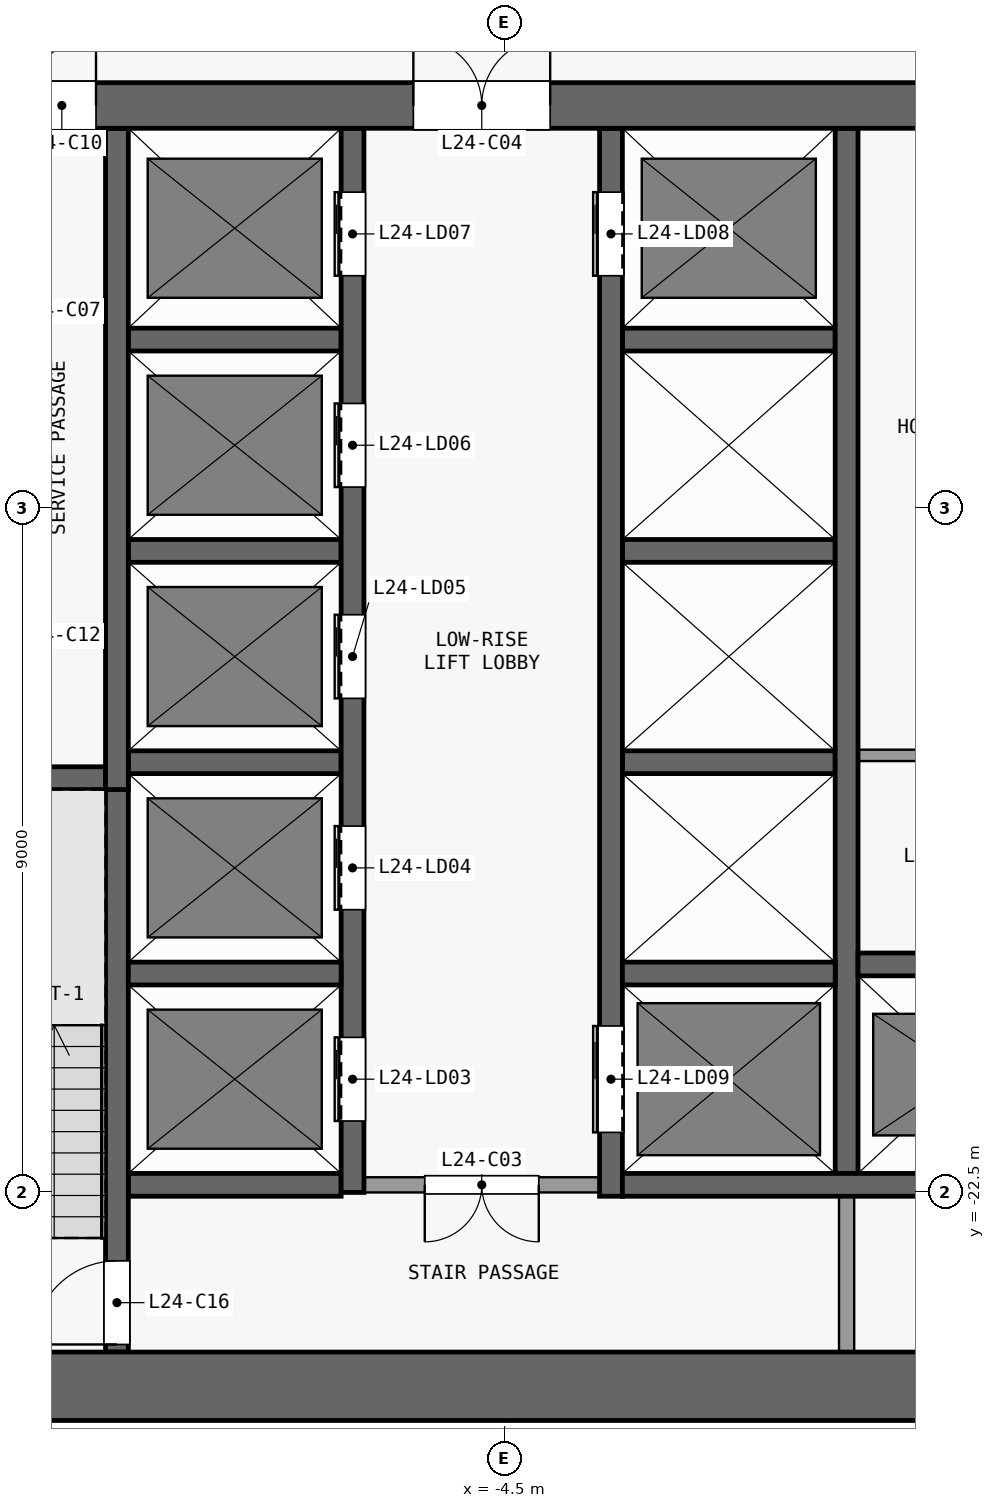
"""IFC4 building model, lengths in metres.
Left out: names, types, materials, properties, quantities, classifications, styles, units other than length and angle.
Written with IfcOpenShell. Run it as: python <this file> out.ifc"""

import sys

from ifc_helpers import new_model, si_unit, direction, frame, frame_2d, origin, place, context, subcontext, project, spatial, rectangle, extrude, element, fill, save


model = new_model("IFC4")
c1 = context("Model", 3, precision=1e-05, world=origin(), true_north=direction((0.0, 1.0)))
c2 = subcontext(c1, "Body", "Model", "MODEL_VIEW")
j1 = project(units=[si_unit("LENGTHUNIT", "METRE"), si_unit("PLANEANGLEUNIT", "RADIAN")], contexts=[c1])
p1 = place(None, origin())
s1 = spatial("IfcSite", under=j1, at=p1, CompositionType="ELEMENT")
p2 = place(p1, origin())
s2 = spatial("IfcBuilding", under=s1, at=p2, CompositionType="ELEMENT")
p3 = place(p2, frame((0.0, 0.0, 99.1)))
s3 = spatial("IfcBuildingStorey", under=s2, at=p3, CompositionType="ELEMENT", Elevation=99.1)
p4 = place(p3, frame((-13.4, -25.05, 0.0), z_axis=(0.0, 0.0, 1.0), x_axis=(1.0, 0.0, 0.0)))
e1 = element("IfcWall", 1, at=p4, inside=s3, PredefinedType="SHEAR", context=c2, shape_type="SweptSolid", body=[
    extrude(rectangle(XDim=26.8, YDim=0.9, at=frame_2d((13.4, 0.0))), origin(), (0.0, 0.0, 1.0), 3.3),
])
p5 = place(p3, frame((-13.4, -8.2, 0.0), z_axis=(0.0, 0.0, 1.0), x_axis=(1.0, 0.0, 0.0)))
e2 = element("IfcWall", 2, at=p5, inside=s3, PredefinedType="SHEAR", context=c2, shape_type="SweptSolid", body=[
    extrude(rectangle(XDim=26.8, YDim=0.6, at=frame_2d((13.4, 0.0))), origin(), (0.0, 0.0, 1.0), 3.3),
])
p6 = place(p5, frame((7.7, 0.0, 0.0)))
e3 = element("IfcOpeningElement", 3, at=p6, cuts=e2, PredefinedType="OPENING", context=c2, shape_type="SweptSolid", body=[
    extrude(rectangle(XDim=1.8, YDim=2.1, at=frame_2d((0.9, 1.05))), frame((0.0, 0.31, 0.0), z_axis=(0.0, -1.0, 0.0), x_axis=(1.0, 0.0, 0.0)), (0.0, 0.0, 1.0), 0.62),
])
p7 = place(p5, frame((17.3, 0.0, 0.0)))
e4 = element("IfcOpeningElement", 4, at=p7, cuts=e2, PredefinedType="OPENING", context=c2, shape_type="SweptSolid", body=[
    extrude(rectangle(XDim=1.8, YDim=2.1, at=frame_2d((0.9, 1.05))), frame((0.0, 0.31, 0.0), z_axis=(0.0, -1.0, 0.0), x_axis=(1.0, 0.0, 0.0)), (0.0, 0.0, 1.0), 0.62),
])
p8 = place(p5, frame((2.625, 0.0, 0.0)))
e5 = element("IfcOpeningElement", 5, at=p8, cuts=e2, PredefinedType="OPENING", context=c2, shape_type="SweptSolid", body=[
    extrude(rectangle(XDim=0.9, YDim=2.1, at=frame_2d((0.45, 1.05))), frame((0.0, 0.31, 0.0), z_axis=(0.0, -1.0, 0.0), x_axis=(1.0, 0.0, 0.0)), (0.0, 0.0, 1.0), 0.62),
])
p9 = place(p5, frame((23.275, 0.0, 0.0)))
e6 = element("IfcOpeningElement", 6, at=p9, cuts=e2, PredefinedType="OPENING", context=c2, shape_type="SweptSolid", body=[
    extrude(rectangle(XDim=0.9, YDim=2.1, at=frame_2d((0.45, 1.05))), frame((0.0, 0.31, 0.0), z_axis=(0.0, -1.0, 0.0), x_axis=(1.0, 0.0, 0.0)), (0.0, 0.0, 1.0), 0.62),
])
p10 = place(p3, frame((-9.45, -22.4, 0.0), z_axis=(0.0, 0.0, 1.0), x_axis=(1.0, 0.0, 0.0)))
e7 = element("IfcWall", 7, at=p10, inside=s3, PredefinedType="SHEAR", context=c2, shape_type="SweptSolid", body=[
    extrude(rectangle(XDim=2.8, YDim=0.3, at=frame_2d((1.4, 0.0))), origin(), (0.0, 0.0, 1.0), 3.3),
])
p11 = place(p3, frame((-3.25, -22.4, 0.0), z_axis=(0.0, 0.0, 1.0), x_axis=(-1.0, 0.0, 0.0)))
e8 = element("IfcWall", 8, at=p11, inside=s3, PredefinedType="PARTITIONING", context=c2, shape_type="SweptSolid", body=[
    extrude(rectangle(XDim=3.1, YDim=0.2, at=frame_2d((1.55, 0.0))), origin(), (0.0, 0.0, 1.0), 3.3),
])
p12 = place(p11, frame((0.8, 0.0, 0.0)))
e9 = element("IfcOpeningElement", 9, at=p12, cuts=e8, PredefinedType="OPENING", context=c2, shape_type="SweptSolid", body=[
    extrude(rectangle(XDim=1.5, YDim=2.1, at=frame_2d((0.75, 1.05))), frame((0.0, 0.11, 0.0), z_axis=(0.0, -1.0, 0.0), x_axis=(1.0, 0.0, 0.0)), (0.0, 0.0, 1.0), 0.22),
])
p13 = place(p3, frame((-2.95, -22.4, 0.0), z_axis=(0.0, 0.0, 1.0), x_axis=(1.0, 0.0, 0.0)))
e10 = element("IfcWall", 10, at=p13, inside=s3, PredefinedType="SHEAR", context=c2, shape_type="SweptSolid", body=[
    extrude(rectangle(XDim=6.2, YDim=0.3, at=frame_2d((3.1, 0.0))), origin(), (0.0, 0.0, 1.0), 3.3),
])
for number, where, z_axis, x_axis in (
    (11, (-9.45, -19.62, 0.0), (0.0, 0.0, 1.0), (1.0, 0.0, 0.0)),
    (12, (-2.95, -19.62, 0.0), (0.0, 0.0, 1.0), (1.0, 0.0, 0.0)),
):
    element("IfcWall", number, at=place(p3, frame(where, z_axis=z_axis, x_axis=x_axis)), inside=s3, PredefinedType="SHEAR", context=c2, shape_type="SweptSolid", body=[
        extrude(rectangle(XDim=2.8, YDim=0.3, at=frame_2d((1.4, 0.0))), origin(), (0.0, 0.0, 1.0), 3.3),
    ])
p14 = place(p3, frame((0.15, -19.5, 0.0), z_axis=(0.0, 0.0, 1.0), x_axis=(1.0, 0.0, 0.0)))
e13 = element("IfcWall", 13, at=p14, inside=s3, PredefinedType="SHEAR", context=c2, shape_type="SweptSolid", body=[
    extrude(rectangle(XDim=3.025, YDim=0.3, at=frame_2d((1.513, 0.0))), origin(), (0.0, 0.0, 1.0), 3.3),
])
p15 = place(p3, frame((-12.6, -17.05, 0.0), z_axis=(0.0, 0.0, 1.0), x_axis=(1.0, 0.0, 0.0)))
e14 = element("IfcWall", 14, at=p15, inside=s3, PredefinedType="SHEAR", context=c2, shape_type="SweptSolid", body=[
    extrude(rectangle(XDim=2.85, YDim=0.3, at=frame_2d((1.425, 0.0))), origin(), (0.0, 0.0, 1.0), 3.3),
])
for number, where, z_axis, x_axis in (
    (15, (-9.45, -16.84, 0.0), (0.0, 0.0, 1.0), (1.0, 0.0, 0.0)),
    (16, (-2.95, -16.84, 0.0), (0.0, 0.0, 1.0), (1.0, 0.0, 0.0)),
):
    element("IfcWall", number, at=place(p3, frame(where, z_axis=z_axis, x_axis=x_axis)), inside=s3, PredefinedType="SHEAR", context=c2, shape_type="SweptSolid", body=[
        extrude(rectangle(XDim=2.8, YDim=0.3, at=frame_2d((1.4, 0.0))), origin(), (0.0, 0.0, 1.0), 3.3),
    ])
p16 = place(p3, frame((0.15, -16.75, 0.0), z_axis=(0.0, 0.0, 1.0), x_axis=(1.0, 0.0, 0.0)))
e17 = element("IfcWall", 17, at=p16, inside=s3, PredefinedType="PARTITIONING", context=c2, shape_type="SweptSolid", body=[
    extrude(rectangle(XDim=2.875, YDim=0.15, at=frame_2d((1.438, 0.0))), origin(), (0.0, 0.0, 1.0), 3.3),
])
for number, where, z_axis, x_axis in (
    (18, (-9.45, -14.06, 0.0), (0.0, 0.0, 1.0), (1.0, 0.0, 0.0)),
    (19, (-2.95, -14.06, 0.0), (0.0, 0.0, 1.0), (1.0, 0.0, 0.0)),
    (20, (-9.45, -11.28, 0.0), (0.0, 0.0, 1.0), (1.0, 0.0, 0.0)),
    (21, (-2.95, -11.28, 0.0), (0.0, 0.0, 1.0), (1.0, 0.0, 0.0)),
):
    element("IfcWall", number, at=place(p3, frame(where, z_axis=z_axis, x_axis=x_axis)), inside=s3, PredefinedType="SHEAR", context=c2, shape_type="SweptSolid", body=[
        extrude(rectangle(XDim=2.8, YDim=0.3, at=frame_2d((1.4, 0.0))), origin(), (0.0, 0.0, 1.0), 3.3),
    ])
p17 = place(p3, frame((-9.6, -24.6, 0.0), z_axis=(0.0, 0.0, 1.0), x_axis=(0.0, 1.0, 0.0)))
e22 = element("IfcWall", 22, at=p17, inside=s3, PredefinedType="SHEAR", context=c2, shape_type="SweptSolid", body=[
    extrude(rectangle(XDim=7.7, YDim=0.3, at=frame_2d((3.85, 0.0))), origin(), (0.0, 0.0, 1.0), 3.3),
])
p18 = place(p17, frame((0.1, 0.0, 0.0)))
e23 = element("IfcOpeningElement", 23, at=p18, cuts=e22, PredefinedType="OPENING", context=c2, shape_type="SweptSolid", body=[
    extrude(rectangle(XDim=1.1, YDim=2.1, at=frame_2d((0.55, 1.05))), frame((0.0, 0.16, 0.0), z_axis=(0.0, -1.0, 0.0), x_axis=(1.0, 0.0, 0.0)), (0.0, 0.0, 1.0), 0.32),
])
p19 = place(p3, frame((-9.6, -17.2, 0.0), z_axis=(0.0, 0.0, 1.0), x_axis=(0.0, 1.0, 0.0)))
e24 = element("IfcWall", 24, at=p19, inside=s3, PredefinedType="SHEAR", context=c2, shape_type="SweptSolid", body=[
    extrude(rectangle(XDim=8.7, YDim=0.3, at=frame_2d((4.35, 0.0))), origin(), (0.0, 0.0, 1.0), 3.3),
])
p20 = place(p3, frame((-6.5, -22.5, 0.0), z_axis=(0.0, 0.0, 1.0), x_axis=(0.0, 1.0, 0.0)))
e25 = element("IfcWall", 25, at=p20, inside=s3, PredefinedType="SHEAR", context=c2, shape_type="SweptSolid", body=[
    extrude(rectangle(XDim=14.0, YDim=0.3, at=frame_2d((7.0, 0.0))), origin(), (0.0, 0.0, 1.0), 3.3),
])
p21 = place(p20, frame((0.94, 0.0, 0.0)))
e26 = element("IfcOpeningElement", 26, at=p21, cuts=e25, PredefinedType="OPENING", context=c2, shape_type="SweptSolid", body=[
    extrude(rectangle(XDim=1.1, YDim=2.1, at=frame_2d((0.55, 1.05))), frame((0.0, 0.16, 0.0), z_axis=(0.0, -1.0, 0.0), x_axis=(1.0, 0.0, 0.0)), (0.0, 0.0, 1.0), 0.32),
])
p22 = place(p20, frame((3.72, 0.0, 0.0)))
e27 = element("IfcOpeningElement", 27, at=p22, cuts=e25, PredefinedType="OPENING", context=c2, shape_type="SweptSolid", body=[
    extrude(rectangle(XDim=1.1, YDim=2.1, at=frame_2d((0.55, 1.05))), frame((0.0, 0.16, 0.0), z_axis=(0.0, -1.0, 0.0), x_axis=(1.0, 0.0, 0.0)), (0.0, 0.0, 1.0), 0.32),
])
p23 = place(p20, frame((6.5, 0.0, 0.0)))
e28 = element("IfcOpeningElement", 28, at=p23, cuts=e25, PredefinedType="OPENING", context=c2, shape_type="SweptSolid", body=[
    extrude(rectangle(XDim=1.1, YDim=2.1, at=frame_2d((0.55, 1.05))), frame((0.0, 0.16, 0.0), z_axis=(0.0, -1.0, 0.0), x_axis=(1.0, 0.0, 0.0)), (0.0, 0.0, 1.0), 0.32),
])
p24 = place(p20, frame((9.28, 0.0, 0.0)))
e29 = element("IfcOpeningElement", 29, at=p24, cuts=e25, PredefinedType="OPENING", context=c2, shape_type="SweptSolid", body=[
    extrude(rectangle(XDim=1.1, YDim=2.1, at=frame_2d((0.55, 1.05))), frame((0.0, 0.16, 0.0), z_axis=(0.0, -1.0, 0.0), x_axis=(1.0, 0.0, 0.0)), (0.0, 0.0, 1.0), 0.32),
])
p25 = place(p20, frame((12.06, 0.0, 0.0)))
e30 = element("IfcOpeningElement", 30, at=p25, cuts=e25, PredefinedType="OPENING", context=c2, shape_type="SweptSolid", body=[
    extrude(rectangle(XDim=1.1, YDim=2.1, at=frame_2d((0.55, 1.05))), frame((0.0, 0.16, 0.0), z_axis=(0.0, -1.0, 0.0), x_axis=(1.0, 0.0, 0.0)), (0.0, 0.0, 1.0), 0.32),
])
p26 = place(p3, frame((-3.1, -22.55, 0.0), z_axis=(0.0, 0.0, 1.0), x_axis=(0.0, 1.0, 0.0)))
e31 = element("IfcWall", 31, at=p26, inside=s3, PredefinedType="SHEAR", context=c2, shape_type="SweptSolid", body=[
    extrude(rectangle(XDim=14.05, YDim=0.3, at=frame_2d((7.025, 0.0))), origin(), (0.0, 0.0, 1.0), 3.3),
])
p27 = place(p26, frame((12.11, 0.0, 0.0)))
e32 = element("IfcOpeningElement", 32, at=p27, cuts=e31, PredefinedType="OPENING", context=c2, shape_type="SweptSolid", body=[
    extrude(rectangle(XDim=1.1, YDim=2.1, at=frame_2d((0.55, 1.05))), frame((0.0, 0.16, 0.0), z_axis=(0.0, -1.0, 0.0), x_axis=(1.0, 0.0, 0.0)), (0.0, 0.0, 1.0), 0.32),
])
p28 = place(p26, frame((0.84, 0.0, 0.0)))
e33 = element("IfcOpeningElement", 33, at=p28, cuts=e31, PredefinedType="OPENING", context=c2, shape_type="SweptSolid", body=[
    extrude(rectangle(XDim=1.4, YDim=2.1, at=frame_2d((0.7, 1.05))), frame((0.0, 0.16, 0.0), z_axis=(0.0, -1.0, 0.0), x_axis=(1.0, 0.0, 0.0)), (0.0, 0.0, 1.0), 0.32),
])
p29 = place(p3, frame((0.0, -24.6, 0.0), z_axis=(0.0, 0.0, 1.0), x_axis=(0.0, 1.0, 0.0)))
e34 = element("IfcWall", 34, at=p29, inside=s3, PredefinedType="PARTITIONING", context=c2, shape_type="SweptSolid", body=[
    extrude(rectangle(XDim=2.05, YDim=0.2, at=frame_2d((1.025, 0.0))), origin(), (0.0, 0.0, 1.0), 3.3),
])
p30 = place(p3, frame((0.0, -22.25, 0.0), z_axis=(0.0, 0.0, 1.0), x_axis=(0.0, 1.0, 0.0)))
e35 = element("IfcWall", 35, at=p30, inside=s3, PredefinedType="SHEAR", context=c2, shape_type="SweptSolid", body=[
    extrude(rectangle(XDim=13.75, YDim=0.3, at=frame_2d((6.875, 0.0))), origin(), (0.0, 0.0, 1.0), 3.3),
])
p31 = place(p21, origin())
e36 = element("IfcDoor", 36, at=p31, inside=s3, OperationType="DOUBLE_DOOR_SLIDING", PredefinedType="DOOR", context=c2, shape_type="SweptSolid", body=[
    extrude(rectangle(XDim=1.1, YDim=2.1, at=frame_2d((0.55, 1.05))), frame((0.0, 0.025, 0.0), z_axis=(0.0, -1.0, 0.0), x_axis=(1.0, 0.0, 0.0)), (0.0, 0.0, 1.0), 0.05),
])
fill(e26, e36)
p32 = place(p22, origin())
e37 = element("IfcDoor", 37, at=p32, inside=s3, OperationType="DOUBLE_DOOR_SLIDING", PredefinedType="DOOR", context=c2, shape_type="SweptSolid", body=[
    extrude(rectangle(XDim=1.1, YDim=2.1, at=frame_2d((0.55, 1.05))), frame((0.0, 0.025, 0.0), z_axis=(0.0, -1.0, 0.0), x_axis=(1.0, 0.0, 0.0)), (0.0, 0.0, 1.0), 0.05),
])
fill(e27, e37)
p33 = place(p23, origin())
e38 = element("IfcDoor", 38, at=p33, inside=s3, OperationType="DOUBLE_DOOR_SLIDING", PredefinedType="DOOR", context=c2, shape_type="SweptSolid", body=[
    extrude(rectangle(XDim=1.1, YDim=2.1, at=frame_2d((0.55, 1.05))), frame((0.0, 0.025, 0.0), z_axis=(0.0, -1.0, 0.0), x_axis=(1.0, 0.0, 0.0)), (0.0, 0.0, 1.0), 0.05),
])
fill(e28, e38)
p34 = place(p24, origin())
e39 = element("IfcDoor", 39, at=p34, inside=s3, OperationType="DOUBLE_DOOR_SLIDING", PredefinedType="DOOR", context=c2, shape_type="SweptSolid", body=[
    extrude(rectangle(XDim=1.1, YDim=2.1, at=frame_2d((0.55, 1.05))), frame((0.0, 0.025, 0.0), z_axis=(0.0, -1.0, 0.0), x_axis=(1.0, 0.0, 0.0)), (0.0, 0.0, 1.0), 0.05),
])
fill(e29, e39)
p35 = place(p25, origin())
e40 = element("IfcDoor", 40, at=p35, inside=s3, OperationType="DOUBLE_DOOR_SLIDING", PredefinedType="DOOR", context=c2, shape_type="SweptSolid", body=[
    extrude(rectangle(XDim=1.1, YDim=2.1, at=frame_2d((0.55, 1.05))), frame((0.0, 0.025, 0.0), z_axis=(0.0, -1.0, 0.0), x_axis=(1.0, 0.0, 0.0)), (0.0, 0.0, 1.0), 0.05),
])
fill(e30, e40)
p36 = place(p27, origin())
e41 = element("IfcDoor", 41, at=p36, inside=s3, OperationType="DOUBLE_DOOR_SLIDING", PredefinedType="DOOR", context=c2, shape_type="SweptSolid", body=[
    extrude(rectangle(XDim=1.1, YDim=2.1, at=frame_2d((0.55, 1.05))), frame((0.0, 0.025, 0.0), z_axis=(0.0, -1.0, 0.0), x_axis=(1.0, 0.0, 0.0)), (0.0, 0.0, 1.0), 0.05),
])
fill(e32, e41)
p37 = place(p28, origin())
e42 = element("IfcDoor", 42, at=p37, inside=s3, OperationType="DOUBLE_DOOR_SLIDING", PredefinedType="DOOR", context=c2, shape_type="SweptSolid", body=[
    extrude(rectangle(XDim=1.4, YDim=2.1, at=frame_2d((0.7, 1.05))), frame((0.0, 0.025, 0.0), z_axis=(0.0, -1.0, 0.0), x_axis=(1.0, 0.0, 0.0)), (0.0, 0.0, 1.0), 0.05),
])
fill(e33, e42)
p38 = place(p12, origin())
e43 = element("IfcDoor", 43, at=p38, inside=s3, OperationType="DOUBLE_DOOR_SINGLE_SWING", PredefinedType="DOOR", context=c2, shape_type="SweptSolid", body=[
    extrude(rectangle(XDim=1.5, YDim=2.1, at=frame_2d((0.75, 1.05))), frame((0.0, 0.025, 0.0), z_axis=(0.0, -1.0, 0.0), x_axis=(1.0, 0.0, 0.0)), (0.0, 0.0, 1.0), 0.05),
])
fill(e9, e43)
p39 = place(p6, origin())
e44 = element("IfcDoor", 44, at=p39, inside=s3, OperationType="DOUBLE_DOOR_SINGLE_SWING", PredefinedType="DOOR", context=c2, shape_type="SweptSolid", body=[
    extrude(rectangle(XDim=1.8, YDim=2.1, at=frame_2d((0.9, 1.05))), frame((0.0, 0.025, 0.0), z_axis=(0.0, -1.0, 0.0), x_axis=(1.0, 0.0, 0.0)), (0.0, 0.0, 1.0), 0.05),
])
fill(e3, e44)
p40 = place(p8, origin())
e45 = element("IfcDoor", 45, at=p40, inside=s3, OperationType="SINGLE_SWING_RIGHT", PredefinedType="DOOR", context=c2, shape_type="SweptSolid", body=[
    extrude(rectangle(XDim=0.9, YDim=2.1, at=frame_2d((0.45, 1.05))), frame((0.0, 0.025, 0.0), z_axis=(0.0, -1.0, 0.0), x_axis=(1.0, 0.0, 0.0)), (0.0, 0.0, 1.0), 0.05),
])
fill(e5, e45)
p41 = place(p18, origin())
e46 = element("IfcDoor", 46, at=p41, inside=s3, OperationType="SINGLE_SWING_LEFT", PredefinedType="DOOR", context=c2, shape_type="SweptSolid", body=[
    extrude(rectangle(XDim=1.1, YDim=2.1, at=frame_2d((0.55, 1.05))), frame((0.0, 0.025, 0.0), z_axis=(0.0, -1.0, 0.0), x_axis=(1.0, 0.0, 0.0)), (0.0, 0.0, 1.0), 0.05),
])
fill(e23, e46)
save(model, sys.argv[1])
